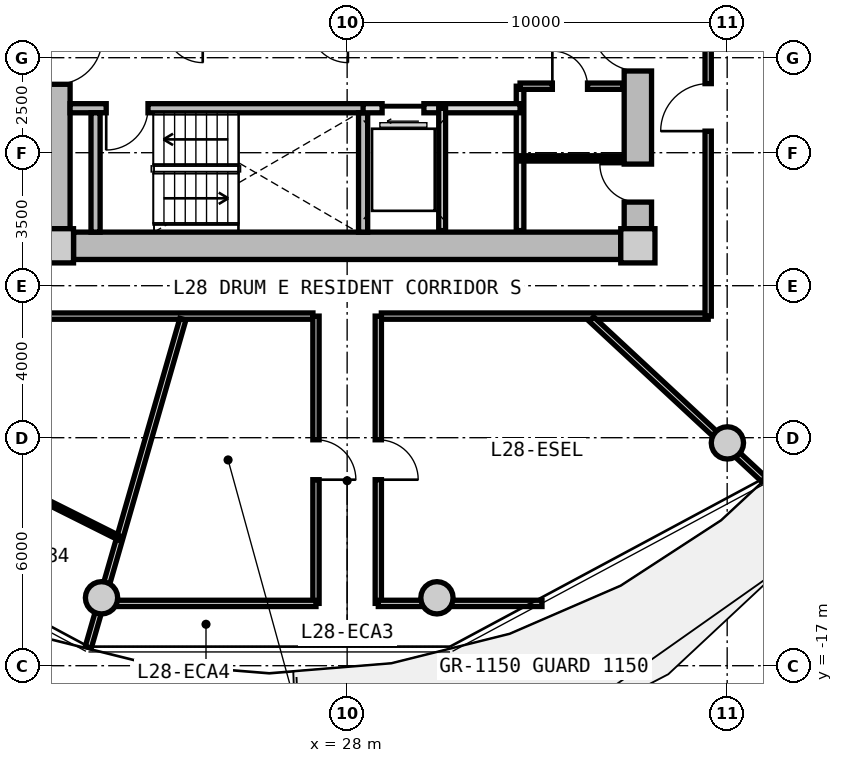
"""IFC4 building model, lengths in metres.
Left out: names, types, materials, properties, quantities, classifications, styles, units other than length and angle.
Written with IfcOpenShell. Run it as: python <this file> out.ifc"""

import sys

from ifc_helpers import new_model, si_unit, direction, frame, frame_2d, origin, origin_2d, place, context, subcontext, project, spatial, rectangle, circle, extrude, source, transform, mapped, element, fill, save


model = new_model("IFC4")
c1 = context("Model", 3, precision=1e-05, world=origin(), true_north=direction((0.0, 1.0)))
c2 = subcontext(c1, "Body", "Model", "MODEL_VIEW")
j1 = project(units=[si_unit("LENGTHUNIT", "METRE"), si_unit("PLANEANGLEUNIT", "RADIAN")], contexts=[c1])
p1 = place(None, origin())
s1 = spatial("IfcSite", under=j1, at=p1, CompositionType="ELEMENT")
p2 = place(p1, origin())
s2 = spatial("IfcBuilding", under=s1, at=p2, CompositionType="ELEMENT")
p3 = place(p2, frame((0.0, 0.0, 93.2)))
s3 = spatial("IfcBuildingStorey", under=s2, at=p3, CompositionType="ELEMENT", Elevation=93.2)
m1 = source(origin(), c2, "Body", "SweptSolid", [
    extrude(rectangle(XDim=0.9, YDim=0.9, at=origin_2d()), origin(), (0.0, 0.0, 1.0), 3.05),
])
for number, where, z_axis, x_axis in (
    (1, (20.35, -5.95, 0.0), (0.0, 0.0, 1.0), (1.0, 0.0, 0.0)),
    (2, (35.65, -5.95, 0.0), (0.0, 0.0, 1.0), (1.0, 0.0, 0.0)),
):
    element("IfcColumn", number, at=place(p3, frame(where, z_axis=z_axis, x_axis=x_axis)), inside=s3, PredefinedType="COLUMN", context=c2, shape_type="MappedRepresentation", body=[
        mapped(m1, transform((0.0, 0.0, 0.0), x_axis=(1.0, 0.0, 0.0), y_axis=(0.0, 1.0, 0.0), z_axis=(0.0, 0.0, 1.0), scale=1.0)),
    ])
m2 = source(origin(), c2, "Body", "SweptSolid", [
    extrude(rectangle(XDim=14.4, YDim=0.72, at=frame_2d((7.2, 0.0))), origin(), (0.0, 0.0, 1.0), 2.79),
])
p4 = place(p3, frame((35.2, -5.95, 0.0), z_axis=(0.0, 0.0, 1.0), x_axis=(-1.0, 0.0, 0.0)))
e3 = element("IfcWall", 3, at=p4, inside=s3, PredefinedType="SHEAR", context=c2, shape_type="MappedRepresentation", body=[
    mapped(m2, transform((0.0, 0.0, 0.0), x_axis=(1.0, 0.0, 0.0), y_axis=(0.0, 1.0, 0.0), z_axis=(0.0, 0.0, 1.0), scale=1.0)),
])
m3 = source(origin(), c2, "Body", "SweptSolid", [
    extrude(rectangle(XDim=11.0, YDim=0.72, at=frame_2d((5.5, 0.0))), origin(), (0.0, 0.0, 1.0), 2.79),
])
p5 = place(p3, frame((20.35, -5.5, 0.0), z_axis=(0.0, 0.0, 1.0), x_axis=(0.0, 1.0, 0.0)))
e4 = element("IfcWall", 4, at=p5, inside=s3, PredefinedType="SHEAR", context=c2, shape_type="MappedRepresentation", body=[
    mapped(m3, transform((0.0, 0.0, 0.0), x_axis=(1.0, 0.0, 0.0), y_axis=(0.0, 1.0, 0.0), z_axis=(0.0, 0.0, 1.0), scale=1.0)),
])
p6 = place(p5, frame((3.8, 0.0, 0.0)))
e5 = element("IfcOpeningElement", 5, at=p6, cuts=e4, PredefinedType="OPENING", context=c2, shape_type="SweptSolid", body=[
    extrude(rectangle(XDim=1.2, YDim=2.15, at=frame_2d((0.6, 1.075))), frame((0.0, 0.37, 0.0), z_axis=(0.0, -1.0, 0.0), x_axis=(1.0, 0.0, 0.0)), (0.0, 0.0, 1.0), 0.74),
])
p7 = place(p3, frame((35.65, 5.5, 0.0), z_axis=(0.0, 0.0, 1.0), x_axis=(0.0, -1.0, 0.0)))
e6 = element("IfcWall", 6, at=p7, inside=s3, PredefinedType="SHEAR", context=c2, shape_type="MappedRepresentation", body=[
    mapped(m3, transform((0.0, 0.0, 0.0), x_axis=(1.0, 0.0, 0.0), y_axis=(0.0, 1.0, 0.0), z_axis=(0.0, 0.0, 1.0), scale=1.0)),
])
p8 = place(p7, frame((5.65, 0.0, 0.0)))
e7 = element("IfcOpeningElement", 7, at=p8, cuts=e6, PredefinedType="OPENING", context=c2, shape_type="SweptSolid", body=[
    extrude(rectangle(XDim=1.2, YDim=2.15, at=frame_2d((0.6, 1.075))), frame((0.0, 0.37, 0.0), z_axis=(0.0, -1.0, 0.0), x_axis=(1.0, 0.0, 0.0)), (0.0, 0.0, 1.0), 0.74),
])
p9 = place(p7, frame((9.3, 0.0, 0.0)))
e8 = element("IfcOpeningElement", 8, at=p9, cuts=e6, PredefinedType="OPENING", context=c2, shape_type="SweptSolid", body=[
    extrude(rectangle(XDim=1.0, YDim=2.1, at=frame_2d((0.5, 1.05))), frame((0.0, 0.37, 0.0), z_axis=(0.0, -1.0, 0.0), x_axis=(1.0, 0.0, 0.0)), (0.0, 0.0, 1.0), 0.74),
])
m4 = source(origin(), c2, "Body", "SweptSolid", [
    extrude(circle(Radius=0.425, at=origin_2d()), origin(), (0.0, 0.0, 1.0), 3.05),
])
for number, where, z_axis, x_axis in (
    (9, (21.537, -15.213, 0.0), (0.0, 0.0, 1.0), (1.0, 0.0, 0.0)),
    (10, (30.363, -15.213, 0.0), (0.0, 0.0, 1.0), (1.0, 0.0, 0.0)),
    (11, (38.006, -11.137, 0.0), (0.0, 0.0, 1.0), (1.0, 0.0, 0.0)),
):
    element("IfcColumn", number, at=place(p3, frame(where, z_axis=z_axis, x_axis=x_axis)), inside=s3, PredefinedType="COLUMN", context=c2, shape_type="MappedRepresentation", body=[
        mapped(m4, transform((0.0, 0.0, 0.0), x_axis=(1.0, 0.0, 0.0), y_axis=(0.0, 1.0, 0.0), z_axis=(0.0, 0.0, 1.0), scale=1.0)),
    ])
m5 = source(origin(), c2, "Body", "SweptSolid", [
    extrude(rectangle(XDim=7.83, YDim=0.24, at=frame_2d((3.915, 0.0))), origin(), (0.0, 0.0, 1.0), 2.79),
])
p10 = place(p3, frame((20.71, -2.33, 0.0), z_axis=(0.0, 0.0, 1.0), x_axis=(1.0, 0.0, 0.0)))
e12 = element("IfcWall", 12, at=p10, inside=s3, PredefinedType="PARTITIONING", context=c2, shape_type="MappedRepresentation", body=[
    mapped(m5, transform((0.0, 0.0, 0.0), x_axis=(1.0, 0.0, 0.0), y_axis=(0.0, 1.0, 0.0), z_axis=(0.0, 0.0, 1.0), scale=1.0)),
])
p11 = place(p10, frame((0.95, 0.0, 0.0)))
e13 = element("IfcOpeningElement", 13, at=p11, cuts=e12, PredefinedType="OPENING", context=c2, shape_type="SweptSolid", body=[
    extrude(rectangle(XDim=1.1, YDim=2.15, at=frame_2d((0.55, 1.075))), frame((0.0, 0.13, 0.0), z_axis=(0.0, -1.0, 0.0), x_axis=(1.0, 0.0, 0.0)), (0.0, 0.0, 1.0), 0.26),
])
m6 = source(origin(), c2, "Body", "SweptSolid", [
    extrude(rectangle(XDim=3.14, YDim=0.24, at=frame_2d((1.57, 0.0))), origin(), (0.0, 0.0, 1.0), 2.79),
])
for number, where, z_axis, x_axis in (
    (14, (21.38, -5.59, 0.0), (0.0, 0.0, 1.0), (0.0, 1.0, 0.0)),
    (15, (28.42, -5.59, 0.0), (0.0, 0.0, 1.0), (0.0, 1.0, 0.0)),
):
    element("IfcWall", number, at=place(p3, frame(where, z_axis=z_axis, x_axis=x_axis)), inside=s3, PredefinedType="PARTITIONING", context=c2, shape_type="MappedRepresentation", body=[
        mapped(m6, transform((0.0, 0.0, 0.0), x_axis=(1.0, 0.0, 0.0), y_axis=(0.0, 1.0, 0.0), z_axis=(0.0, 0.0, 1.0), scale=1.0)),
    ])
m7 = source(origin(), c2, "Body", "SweptSolid", [
    extrude(rectangle(XDim=3.8, YDim=0.2, at=frame_2d((1.9, 0.0))), origin(), (0.0, 0.0, 1.0), 2.775),
])
p12 = place(p3, frame((32.55, -5.55, 0.0), z_axis=(0.0, 0.0, 1.0), x_axis=(0.0, 1.0, 0.0)))
e16 = element("IfcWall", 16, at=p12, inside=s3, PredefinedType="PARTITIONING", context=c2, shape_type="MappedRepresentation", body=[
    mapped(m7, transform((0.0, 0.0, 0.0), x_axis=(1.0, 0.0, 0.0), y_axis=(0.0, 1.0, 0.0), z_axis=(0.0, 0.0, 1.0), scale=1.0)),
])
m8 = source(origin(), c2, "Body", "SweptSolid", [
    extrude(rectangle(XDim=4.13, YDim=0.24, at=frame_2d((2.065, 0.0))), origin(), (0.0, 0.0, 1.0), 2.775),
])
p13 = place(p3, frame((28.42, -2.33, 0.0), z_axis=(0.0, 0.0, 1.0), x_axis=(1.0, 0.0, 0.0)))
e17 = element("IfcWall", 17, at=p13, inside=s3, PredefinedType="PARTITIONING", context=c2, shape_type="MappedRepresentation", body=[
    mapped(m8, transform((0.0, 0.0, 0.0), x_axis=(1.0, 0.0, 0.0), y_axis=(0.0, 1.0, 0.0), z_axis=(0.0, 0.0, 1.0), scale=1.0)),
])
p14 = place(p13, frame((0.5, 0.0, 0.0)))
e18 = element("IfcOpeningElement", 18, at=p14, cuts=e17, PredefinedType="OPENING", context=c2, shape_type="SweptSolid", body=[
    extrude(rectangle(XDim=1.1, YDim=2.2, at=frame_2d((0.55, 1.1))), frame((0.0, 0.13, 0.0), z_axis=(0.0, -1.0, 0.0), x_axis=(1.0, 0.0, 0.0)), (0.0, 0.0, 1.0), 0.26),
])
m9 = source(origin(), c2, "Body", "SweptSolid", [
    extrude(rectangle(XDim=3.22, YDim=0.18, at=frame_2d((1.61, 0.0))), origin(), (0.0, 0.0, 1.0), 2.775),
])
p15 = place(p3, frame((30.5, -5.55, 0.0), z_axis=(0.0, 0.0, 1.0), x_axis=(0.0, 1.0, 0.0)))
e19 = element("IfcWall", 19, at=p15, inside=s3, PredefinedType="PARTITIONING", context=c2, shape_type="MappedRepresentation", body=[
    mapped(m9, transform((0.0, 0.0, 0.0), x_axis=(1.0, 0.0, 0.0), y_axis=(0.0, 1.0, 0.0), z_axis=(0.0, 0.0, 1.0), scale=1.0)),
])
m10 = source(origin(), c2, "Body", "SweptSolid", [
    extrude(rectangle(XDim=2.7, YDim=0.165, at=frame_2d((1.35, 0.0))), origin(), (0.0, 0.0, 1.0), 2.775),
])
p16 = place(p3, frame((32.55, -1.75, 0.0), z_axis=(0.0, 0.0, 1.0), x_axis=(1.0, 0.0, 0.0)))
e20 = element("IfcWall", 20, at=p16, inside=s3, PredefinedType="PARTITIONING", context=c2, shape_type="MappedRepresentation", body=[
    mapped(m10, transform((0.0, 0.0, 0.0), x_axis=(1.0, 0.0, 0.0), y_axis=(0.0, 1.0, 0.0), z_axis=(0.0, 0.0, 1.0), scale=1.0)),
])
p17 = place(p16, frame((0.85, 0.0, 0.0)))
e21 = element("IfcOpeningElement", 21, at=p17, cuts=e20, PredefinedType="OPENING", context=c2, shape_type="SweptSolid", body=[
    extrude(rectangle(XDim=0.925, YDim=2.1, at=frame_2d((0.462, 1.05))), frame((0.0, 0.093, 0.0), z_axis=(0.0, -1.0, 0.0), x_axis=(1.0, 0.0, 0.0)), (0.0, 0.0, 1.0), 0.185),
])
m11 = source(origin(), c2, "Body", "SweptSolid", [
    extrude(rectangle(XDim=2.7, YDim=0.14, at=frame_2d((1.35, 0.0))), origin(), (0.0, 0.0, 1.0), 2.775),
])
p18 = place(p3, frame((32.55, -3.65, 0.0), z_axis=(0.0, 0.0, 1.0), x_axis=(1.0, 0.0, 0.0)))
e22 = element("IfcWall", 22, at=p18, inside=s3, PredefinedType="PARTITIONING", context=c2, shape_type="MappedRepresentation", body=[
    mapped(m11, transform((0.0, 0.0, 0.0), x_axis=(1.0, 0.0, 0.0), y_axis=(0.0, 1.0, 0.0), z_axis=(0.0, 0.0, 1.0), scale=1.0)),
])
m12 = source(origin(), c2, "Body", "SweptSolid", [
    extrude(rectangle(XDim=8.6, YDim=0.165, at=frame_2d((4.3, 0.0))), origin(), (0.0, 0.0, 1.0), 2.775),
])
for number, where, z_axis, x_axis in (
    (23, (37.5, -7.8, 0.0), (0.0, 0.0, 1.0), (-1.0, 0.0, 0.0)),
    (24, (27.1, -7.8, 0.0), (0.0, 0.0, 1.0), (-1.0, 0.0, 0.0)),
):
    element("IfcWall", number, at=place(p3, frame(where, z_axis=z_axis, x_axis=x_axis)), inside=s3, PredefinedType="PARTITIONING", context=c2, shape_type="MappedRepresentation", body=[
        mapped(m12, transform((0.0, 0.0, 0.0), x_axis=(1.0, 0.0, 0.0), y_axis=(0.0, 1.0, 0.0), z_axis=(0.0, 0.0, 1.0), scale=1.0)),
    ])
m13 = source(origin(), c2, "Body", "SweptSolid", [
    extrude(rectangle(XDim=15.6, YDim=0.165, at=frame_2d((7.8, 0.0))), origin(), (0.0, 0.0, 1.0), 2.775),
])
p19 = place(p3, frame((37.5, 7.8, 0.0), z_axis=(0.0, 0.0, 1.0), x_axis=(0.0, -1.0, 0.0)))
e25 = element("IfcWall", 25, at=p19, inside=s3, PredefinedType="PARTITIONING", context=c2, shape_type="MappedRepresentation", body=[
    mapped(m13, transform((0.0, 0.0, 0.0), x_axis=(1.0, 0.0, 0.0), y_axis=(0.0, 1.0, 0.0), z_axis=(0.0, 0.0, 1.0), scale=1.0)),
])
p20 = place(p19, frame((9.482, 0.0, 0.0)))
e26 = element("IfcOpeningElement", 26, at=p20, cuts=e25, PredefinedType="OPENING", context=c2, shape_type="SweptSolid", body=[
    extrude(rectangle(XDim=1.25, YDim=2.2, at=frame_2d((0.625, 1.1))), frame((0.0, 0.093, 0.0), z_axis=(0.0, -1.0, 0.0), x_axis=(1.0, 0.0, 0.0)), (0.0, 0.0, 1.0), 0.185),
])
m14 = source(origin(), c2, "Body", "SweptSolid", [
    extrude(rectangle(XDim=8.989, YDim=0.165, at=frame_2d((4.495, 0.0))), origin(), (0.0, 0.0, 1.0), 2.275),
])
p21 = place(p3, frame((23.678, -7.88, 0.0), z_axis=(0.0, 0.0, 1.0), x_axis=(-0.27702323008, -0.960863221274, 0.0)))
e27 = element("IfcWall", 27, at=p21, inside=s3, PredefinedType="PARTITIONING", context=c2, shape_type="MappedRepresentation", body=[
    mapped(m14, transform((0.0, 0.0, 0.0), x_axis=(1.0, 0.0, 0.0), y_axis=(0.0, 1.0, 0.0), z_axis=(0.0, 0.0, 1.0), scale=1.0)),
])
m15 = source(origin(), c2, "Body", "SweptSolid", [
    extrude(rectangle(XDim=6.187, YDim=0.165, at=frame_2d((3.093, 0.0))), origin(), (0.0, 0.0, 1.0), 2.275),
])
p22 = place(p3, frame((34.429, -7.88, 0.0), z_axis=(0.0, 0.0, 1.0), x_axis=(0.732501077882, -0.680765870841, 0.0)))
e28 = element("IfcWall", 28, at=p22, inside=s3, PredefinedType="PARTITIONING", context=c2, shape_type="MappedRepresentation", body=[
    mapped(m15, transform((0.0, 0.0, 0.0), x_axis=(1.0, 0.0, 0.0), y_axis=(0.0, 1.0, 0.0), z_axis=(0.0, 0.0, 1.0), scale=1.0)),
])
m16 = source(origin(), c2, "Body", "SweptSolid", [
    extrude(rectangle(XDim=7.56, YDim=0.165, at=frame_2d((3.78, 0.0))), origin(), (0.0, 0.0, 1.0), 2.775),
])
p23 = place(p3, frame((27.18, -15.36, 0.0), z_axis=(0.0, 0.0, 1.0), x_axis=(0.0, 1.0, 0.0)))
e29 = element("IfcWall", 29, at=p23, inside=s3, PredefinedType="PARTITIONING", context=c2, shape_type="MappedRepresentation", body=[
    mapped(m16, transform((0.0, 0.0, 0.0), x_axis=(1.0, 0.0, 0.0), y_axis=(0.0, 1.0, 0.0), z_axis=(0.0, 0.0, 1.0), scale=1.0)),
])
p24 = place(p23, frame((3.255, 0.0, 0.0)))
e30 = element("IfcOpeningElement", 30, at=p24, cuts=e29, PredefinedType="OPENING", context=c2, shape_type="SweptSolid", body=[
    extrude(rectangle(XDim=1.05, YDim=2.15, at=frame_2d((0.525, 1.075))), frame((0.0, 0.093, 0.0), z_axis=(0.0, -1.0, 0.0), x_axis=(1.0, 0.0, 0.0)), (0.0, 0.0, 1.0), 0.185),
])
m17 = source(origin(), c2, "Body", "SweptSolid", [
    extrude(rectangle(XDim=5.814, YDim=0.165, at=frame_2d((2.907, 0.0))), origin(), (0.0, 0.0, 1.0), 2.275),
])
p25 = place(p3, frame((21.366, -15.36, 0.0), z_axis=(0.0, 0.0, 1.0), x_axis=(1.0, 0.0, 0.0)))
e31 = element("IfcWall", 31, at=p25, inside=s3, PredefinedType="PARTITIONING", context=c2, shape_type="MappedRepresentation", body=[
    mapped(m17, transform((0.0, 0.0, 0.0), x_axis=(1.0, 0.0, 0.0), y_axis=(0.0, 1.0, 0.0), z_axis=(0.0, 0.0, 1.0), scale=1.0)),
])
p26 = place(p3, frame((28.82, -15.36, 0.0), z_axis=(0.0, 0.0, 1.0), x_axis=(0.0, 1.0, 0.0)))
e32 = element("IfcWall", 32, at=p26, inside=s3, PredefinedType="PARTITIONING", context=c2, shape_type="MappedRepresentation", body=[
    mapped(m16, transform((0.0, 0.0, 0.0), x_axis=(1.0, 0.0, 0.0), y_axis=(0.0, 1.0, 0.0), z_axis=(0.0, 0.0, 1.0), scale=1.0)),
])
p27 = place(p26, frame((3.255, 0.0, 0.0)))
e33 = element("IfcOpeningElement", 33, at=p27, cuts=e32, PredefinedType="OPENING", context=c2, shape_type="SweptSolid", body=[
    extrude(rectangle(XDim=1.05, YDim=2.15, at=frame_2d((0.525, 1.075))), frame((0.0, 0.093, 0.0), z_axis=(0.0, -1.0, 0.0), x_axis=(1.0, 0.0, 0.0)), (0.0, 0.0, 1.0), 0.185),
])
m18 = source(origin(), c2, "Body", "SweptSolid", [
    extrude(rectangle(XDim=4.307, YDim=0.165, at=frame_2d((2.153, 0.0))), origin(), (0.0, 0.0, 1.0), 2.275),
])
p28 = place(p3, frame((28.82, -15.36, 0.0), z_axis=(0.0, 0.0, 1.0), x_axis=(1.0, 0.0, 0.0)))
e34 = element("IfcWall", 34, at=p28, inside=s3, PredefinedType="PARTITIONING", context=c2, shape_type="MappedRepresentation", body=[
    mapped(m18, transform((0.0, 0.0, 0.0), x_axis=(1.0, 0.0, 0.0), y_axis=(0.0, 1.0, 0.0), z_axis=(0.0, 0.0, 1.0), scale=1.0)),
])
m19 = source(origin(), c2, "Body", "SweptSolid", [
    extrude(rectangle(XDim=7.767, YDim=0.115, at=frame_2d((3.884, 0.0))), origin(), (0.0, 0.0, 1.0), 2.775),
])
p29 = place(p3, frame((15.07, -10.167, 0.0), z_axis=(0.0, 0.0, 1.0), x_axis=(0.894188177352, -0.447691303783, 0.0)))
e35 = element("IfcWall", 35, at=p29, inside=s3, PredefinedType="PARTITIONING", context=c2, shape_type="MappedRepresentation", body=[
    mapped(m19, transform((0.0, 0.0, 0.0), x_axis=(1.0, 0.0, 0.0), y_axis=(0.0, 1.0, 0.0), z_axis=(0.0, 0.0, 1.0), scale=1.0)),
])
p30 = place(p29, frame((3.409, 0.0, 0.0)))
e36 = element("IfcOpeningElement", 36, at=p30, cuts=e35, PredefinedType="OPENING", context=c2, shape_type="SweptSolid", body=[
    extrude(rectangle(XDim=0.95, YDim=2.1, at=frame_2d((0.475, 1.05))), frame((0.0, 0.067, 0.0), z_axis=(0.0, -1.0, 0.0), x_axis=(1.0, 0.0, 0.0)), (0.0, 0.0, 1.0), 0.135),
])
m20 = source(origin(), c2, "Body", "SweptSolid", [
    extrude(rectangle(XDim=1.1, YDim=2.15, at=frame_2d((0.55, 1.075))), frame((0.0, 0.025, 0.0), z_axis=(0.0, -1.0, 0.0), x_axis=(1.0, 0.0, 0.0)), (0.0, 0.0, 1.0), 0.05),
])
p31 = place(p11, frame((1.1, 0.0, 0.0), z_axis=(0.0, 0.0, 1.0), x_axis=(-1.0, 0.0, 0.0)))
e37 = element("IfcDoor", 37, at=p31, inside=s3, OperationType="SINGLE_SWING_RIGHT", PredefinedType="DOOR", context=c2, shape_type="MappedRepresentation", body=[
    mapped(m20, transform((0.0, 0.0, 0.0), x_axis=(1.0, 0.0, 0.0), y_axis=(0.0, 1.0, 0.0), z_axis=(0.0, 0.0, 1.0), scale=1.0)),
])
fill(e13, e37)
m21 = source(origin(), c2, "Body", "SweptSolid", [
    extrude(rectangle(XDim=1.2, YDim=2.15, at=frame_2d((0.6, 1.075))), frame((0.0, 0.025, 0.0), z_axis=(0.0, -1.0, 0.0), x_axis=(1.0, 0.0, 0.0)), (0.0, 0.0, 1.0), 0.05),
])
p32 = place(p6, frame((1.2, 0.0, 0.0), z_axis=(0.0, 0.0, 1.0), x_axis=(-1.0, 0.0, 0.0)))
e38 = element("IfcDoor", 38, at=p32, inside=s3, OperationType="SINGLE_SWING_LEFT", PredefinedType="DOOR", context=c2, shape_type="MappedRepresentation", body=[
    mapped(m21, transform((0.0, 0.0, 0.0), x_axis=(1.0, 0.0, 0.0), y_axis=(0.0, 1.0, 0.0), z_axis=(0.0, 0.0, 1.0), scale=1.0)),
])
fill(e5, e38)
p33 = place(p8, frame((1.2, 0.0, 0.0), z_axis=(0.0, 0.0, 1.0), x_axis=(-1.0, 0.0, 0.0)))
e39 = element("IfcDoor", 39, at=p33, inside=s3, OperationType="SINGLE_SWING_RIGHT", PredefinedType="DOOR", context=c2, shape_type="MappedRepresentation", body=[
    mapped(m21, transform((0.0, 0.0, 0.0), x_axis=(1.0, 0.0, 0.0), y_axis=(0.0, 1.0, 0.0), z_axis=(0.0, 0.0, 1.0), scale=1.0)),
])
fill(e7, e39)
m22 = source(origin(), c2, "Body", "SweptSolid", [
    extrude(rectangle(XDim=1.1, YDim=2.2, at=frame_2d((0.55, 1.1))), frame((0.0, 0.025, 0.0), z_axis=(0.0, -1.0, 0.0), x_axis=(1.0, 0.0, 0.0)), (0.0, 0.0, 1.0), 0.05),
])
p34 = place(p14, frame((1.1, 0.0, 0.0), z_axis=(0.0, 0.0, 1.0), x_axis=(-1.0, 0.0, 0.0)))
e40 = element("IfcDoor", 40, at=p34, inside=s3, OperationType="SLIDING_TO_LEFT", PredefinedType="DOOR", context=c2, shape_type="MappedRepresentation", body=[
    mapped(m22, transform((0.0, 0.0, 0.0), x_axis=(1.0, 0.0, 0.0), y_axis=(0.0, 1.0, 0.0), z_axis=(0.0, 0.0, 1.0), scale=1.0)),
])
fill(e18, e40)
m23 = source(origin(), c2, "Body", "SweptSolid", [
    extrude(rectangle(XDim=0.925, YDim=2.1, at=frame_2d((0.462, 1.05))), frame((0.0, 0.025, 0.0), z_axis=(0.0, -1.0, 0.0), x_axis=(1.0, 0.0, 0.0)), (0.0, 0.0, 1.0), 0.05),
])
p35 = place(p17, origin())
e41 = element("IfcDoor", 41, at=p35, inside=s3, OperationType="SINGLE_SWING_LEFT", PredefinedType="DOOR", context=c2, shape_type="MappedRepresentation", body=[
    mapped(m23, transform((0.0, 0.0, 0.0), x_axis=(1.0, 0.0, 0.0), y_axis=(0.0, 1.0, 0.0), z_axis=(0.0, 0.0, 1.0), scale=1.0)),
])
fill(e21, e41)
m24 = source(origin(), c2, "Body", "SweptSolid", [
    extrude(rectangle(XDim=1.0, YDim=2.1, at=frame_2d((0.5, 1.05))), frame((0.0, 0.025, 0.0), z_axis=(0.0, -1.0, 0.0), x_axis=(1.0, 0.0, 0.0)), (0.0, 0.0, 1.0), 0.05),
])
p36 = place(p9, frame((1.0, 0.0, 0.0), z_axis=(0.0, 0.0, 1.0), x_axis=(-1.0, 0.0, 0.0)))
e42 = element("IfcDoor", 42, at=p36, inside=s3, OperationType="SINGLE_SWING_RIGHT", PredefinedType="DOOR", context=c2, shape_type="MappedRepresentation", body=[
    mapped(m24, transform((0.0, 0.0, 0.0), x_axis=(1.0, 0.0, 0.0), y_axis=(0.0, 1.0, 0.0), z_axis=(0.0, 0.0, 1.0), scale=1.0)),
])
fill(e8, e42)
m25 = source(origin(), c2, "Body", "SweptSolid", [
    extrude(rectangle(XDim=1.05, YDim=2.15, at=frame_2d((0.525, 1.075))), frame((0.0, 0.025, 0.0), z_axis=(0.0, -1.0, 0.0), x_axis=(1.0, 0.0, 0.0)), (0.0, 0.0, 1.0), 0.05),
])
p37 = place(p24, frame((1.05, 0.0, 0.0), z_axis=(0.0, 0.0, 1.0), x_axis=(-1.0, 0.0, 0.0)))
e43 = element("IfcDoor", 43, at=p37, inside=s3, OperationType="SINGLE_SWING_RIGHT", PredefinedType="DOOR", context=c2, shape_type="MappedRepresentation", body=[
    mapped(m25, transform((0.0, 0.0, 0.0), x_axis=(1.0, 0.0, 0.0), y_axis=(0.0, 1.0, 0.0), z_axis=(0.0, 0.0, 1.0), scale=1.0)),
])
fill(e30, e43)
p38 = place(p27, frame((1.05, 0.0, 0.0), z_axis=(0.0, 0.0, 1.0), x_axis=(-1.0, 0.0, 0.0)))
e44 = element("IfcDoor", 44, at=p38, inside=s3, OperationType="SINGLE_SWING_RIGHT", PredefinedType="DOOR", context=c2, shape_type="MappedRepresentation", body=[
    mapped(m25, transform((0.0, 0.0, 0.0), x_axis=(1.0, 0.0, 0.0), y_axis=(0.0, 1.0, 0.0), z_axis=(0.0, 0.0, 1.0), scale=1.0)),
])
fill(e33, e44)
m26 = source(origin(), c2, "Body", "SweptSolid", [
    extrude(rectangle(XDim=1.25, YDim=2.2, at=frame_2d((0.625, 1.1))), frame((0.0, 0.025, 0.0), z_axis=(0.0, -1.0, 0.0), x_axis=(1.0, 0.0, 0.0)), (0.0, 0.0, 1.0), 0.05),
])
p39 = place(p20, frame((1.25, 0.0, 0.0), z_axis=(0.0, 0.0, 1.0), x_axis=(-1.0, 0.0, 0.0)))
e45 = element("IfcDoor", 45, at=p39, inside=s3, OperationType="SINGLE_SWING_LEFT", PredefinedType="DOOR", context=c2, shape_type="MappedRepresentation", body=[
    mapped(m26, transform((0.0, 0.0, 0.0), x_axis=(1.0, 0.0, 0.0), y_axis=(0.0, 1.0, 0.0), z_axis=(0.0, 0.0, 1.0), scale=1.0)),
])
fill(e26, e45)
save(model, sys.argv[1])
